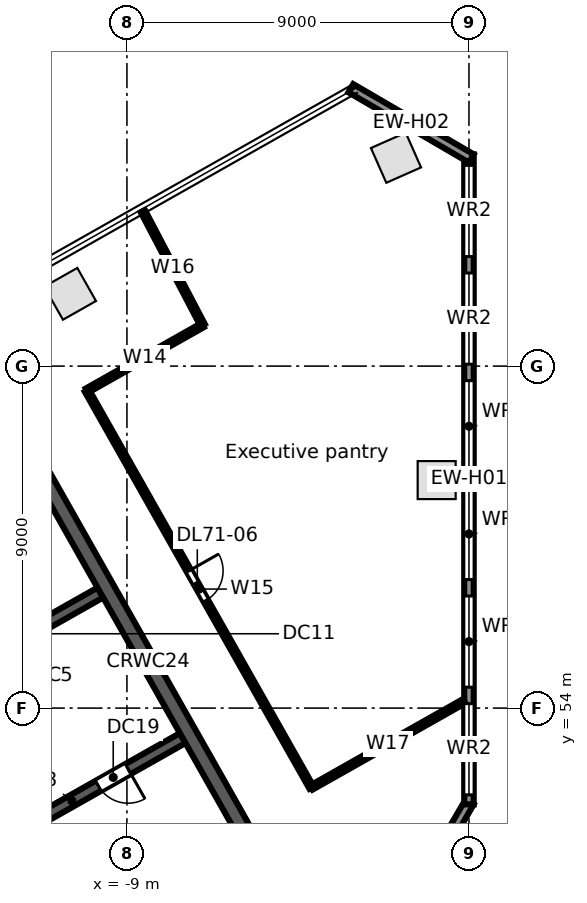
"""IFC4 building model, lengths in metres.
Left out: names, types, materials, properties, quantities, classifications, styles, units other than length and angle.
Written with IfcOpenShell. Run it as: python <this file> out.ifc"""

import sys

from ifc_helpers import new_model, si_unit, direction, frame, frame_2d, origin, origin_2d, place, context, subcontext, project, spatial, rectangle, extrude, element, fill, save


model = new_model("IFC4")
c1 = context("Model", 3, precision=1e-05, world=origin(), true_north=direction((0.0, 1.0)))
c2 = subcontext(c1, "Body", "Model", "MODEL_VIEW")
j1 = project(units=[si_unit("LENGTHUNIT", "METRE"), si_unit("PLANEANGLEUNIT", "RADIAN")], contexts=[c1])
p1 = place(None, origin())
s1 = spatial("IfcSite", under=j1, at=p1, CompositionType="ELEMENT")
p2 = place(p1, origin())
s2 = spatial("IfcBuilding", under=s1, at=p2, CompositionType="ELEMENT")
p3 = place(p2, frame((0.0, 0.0, 316.5)))
s3 = spatial("IfcBuildingStorey", under=s2, at=p3, CompositionType="ELEMENT", Elevation=316.5)
for number, where, z_axis, x_axis in (
    (1, (-10.495, 64.902, 0.0), (0.0, 0.0, 1.0), (-0.87, -0.492, 0.0)),
    (2, (-0.85, 60.0, 0.0), (0.0, 0.0, 1.0), (0.0, 1.0, 0.0)),
    (3, (-1.92, 68.483, 0.0), (0.0, 0.0, 1.0), (-0.915, -0.404, 0.0)),
):
    element("IfcColumn", number, at=place(p3, frame(where, z_axis=z_axis, x_axis=x_axis)), inside=s3, PredefinedType="COLUMN", context=c2, shape_type="SweptSolid", body=[
        extrude(rectangle(XDim=1.0, YDim=1.0, at=origin_2d()), origin(), (0.0, 0.0, 1.0), 3.8),
    ])
p4 = place(p3, frame((0.017, 51.529, 0.0), z_axis=(0.0, 0.0, 1.0), x_axis=(-0.503769237131, -0.863838269424, 0.0)))
e4 = element("IfcWall", 4, at=p4, inside=s3, PredefinedType="STANDARD", context=c2, shape_type="SweptSolid", body=[
    extrude(rectangle(XDim=6.115, YDim=0.25, at=frame_2d((3.057, 0.0))), origin(), (0.0, 0.0, 1.0), 3.52),
])
p5 = place(p3, frame((0.0, 68.572, 0.0), z_axis=(0.0, 0.0, 1.0), x_axis=(0.0, -1.0, 0.0)))
e5 = element("IfcWall", 5, at=p5, inside=s3, PredefinedType="STANDARD", context=c2, shape_type="SweptSolid", body=[
    extrude(rectangle(XDim=17.105, YDim=0.25, at=frame_2d((8.553, 0.0))), origin(), (0.0, 0.0, 1.0), 3.52),
])
p6 = place(p5, frame((14.455, 0.0, 0.8)))
e6 = element("IfcOpeningElement", 6, at=p6, cuts=e5, PredefinedType="OPENING", context=c2, shape_type="SweptSolid", body=[
    extrude(rectangle(XDim=2.4, YDim=2.2, at=frame_2d((1.2, 1.1))), frame((0.0, 0.135, 0.0), z_axis=(0.0, -1.0, 0.0), x_axis=(1.0, 0.0, 0.0)), (0.0, 0.0, 1.0), 0.27),
])
p7 = place(p5, frame((11.622, 0.0, 0.8)))
e7 = element("IfcOpeningElement", 7, at=p7, cuts=e5, PredefinedType="OPENING", context=c2, shape_type="SweptSolid", body=[
    extrude(rectangle(XDim=2.4, YDim=2.2, at=frame_2d((1.2, 1.1))), frame((0.0, 0.135, 0.0), z_axis=(0.0, -1.0, 0.0), x_axis=(1.0, 0.0, 0.0)), (0.0, 0.0, 1.0), 0.27),
])
p8 = place(p5, frame((8.789, 0.0, 0.8)))
e8 = element("IfcOpeningElement", 8, at=p8, cuts=e5, PredefinedType="OPENING", context=c2, shape_type="SweptSolid", body=[
    extrude(rectangle(XDim=2.4, YDim=2.2, at=frame_2d((1.2, 1.1))), frame((0.0, 0.135, 0.0), z_axis=(0.0, -1.0, 0.0), x_axis=(1.0, 0.0, 0.0)), (0.0, 0.0, 1.0), 0.27),
])
p9 = place(p5, frame((5.955, 0.0, 0.8)))
e9 = element("IfcOpeningElement", 9, at=p9, cuts=e5, PredefinedType="OPENING", context=c2, shape_type="SweptSolid", body=[
    extrude(rectangle(XDim=2.4, YDim=2.2, at=frame_2d((1.2, 1.1))), frame((0.0, 0.135, 0.0), z_axis=(0.0, -1.0, 0.0), x_axis=(1.0, 0.0, 0.0)), (0.0, 0.0, 1.0), 0.27),
])
p10 = place(p5, frame((3.122, 0.0, 0.8)))
e10 = element("IfcOpeningElement", 10, at=p10, cuts=e5, PredefinedType="OPENING", context=c2, shape_type="SweptSolid", body=[
    extrude(rectangle(XDim=2.4, YDim=2.2, at=frame_2d((1.2, 1.1))), frame((0.0, 0.135, 0.0), z_axis=(0.0, -1.0, 0.0), x_axis=(1.0, 0.0, 0.0)), (0.0, 0.0, 1.0), 0.27),
])
p11 = place(p5, frame((0.289, 0.0, 0.8)))
e11 = element("IfcOpeningElement", 11, at=p11, cuts=e5, PredefinedType="OPENING", context=c2, shape_type="SweptSolid", body=[
    extrude(rectangle(XDim=2.4, YDim=2.2, at=frame_2d((1.2, 1.1))), frame((0.0, 0.135, 0.0), z_axis=(0.0, -1.0, 0.0), x_axis=(1.0, 0.0, 0.0)), (0.0, 0.0, 1.0), 0.27),
])
p12 = place(p3, frame((-3.108, 70.313, 0.0), z_axis=(0.0, 0.0, 1.0), x_axis=(0.86382474085, -0.503792434536, 0.0)))
e12 = element("IfcWall", 12, at=p12, inside=s3, PredefinedType="STANDARD", context=c2, shape_type="SweptSolid", body=[
    extrude(rectangle(XDim=3.67, YDim=0.25, at=frame_2d((1.835, 0.0))), origin(), (0.0, 0.0, 1.0), 3.52),
])
p13 = place(p3, frame((-13.365, 49.911, 0.0), z_axis=(0.0, 0.0, 1.0), x_axis=(0.870347618718, 0.492437836272, 0.0)))
e13 = element("IfcWall", 13, at=p13, inside=s3, PredefinedType="SOLIDWALL", context=c2, shape_type="SweptSolid", body=[
    extrude(rectangle(XDim=6.7, YDim=0.3, at=frame_2d((3.35, 0.0))), origin(), (0.0, 0.0, 1.0), 3.52),
])
p14 = place(p13, frame((0.75, 0.0, 0.0)))
e14 = element("IfcOpeningElement", 14, at=p14, cuts=e13, PredefinedType="OPENING", context=c2, shape_type="SweptSolid", body=[
    extrude(rectangle(XDim=0.9, YDim=2.1, at=frame_2d((0.45, 1.05))), frame((0.0, 0.16, 0.0), z_axis=(0.0, -1.0, 0.0), x_axis=(1.0, 0.0, 0.0)), (0.0, 0.0, 1.0), 0.32),
])
p15 = place(p13, frame((4.15, 0.0, 0.0)))
e15 = element("IfcOpeningElement", 15, at=p15, cuts=e13, PredefinedType="OPENING", context=c2, shape_type="SweptSolid", body=[
    extrude(rectangle(XDim=0.9, YDim=2.1, at=frame_2d((0.45, 1.05))), frame((0.0, 0.16, 0.0), z_axis=(0.0, -1.0, 0.0), x_axis=(1.0, 0.0, 0.0)), (0.0, 0.0, 1.0), 0.32),
])
p16 = place(p3, frame((-15.618, 53.691, 0.0), z_axis=(0.0, 0.0, 1.0), x_axis=(0.870362830851, 0.492410948978, 0.0)))
e16 = element("IfcWall", 16, at=p16, inside=s3, PredefinedType="SOLIDWALL", context=c2, shape_type="SweptSolid", body=[
    extrude(rectangle(XDim=6.8, YDim=0.3, at=frame_2d((3.4, 0.0))), origin(), (0.0, 0.0, 1.0), 3.52),
])
p17 = place(p16, frame((0.7, 0.0, 0.0)))
e17 = element("IfcOpeningElement", 17, at=p17, cuts=e16, PredefinedType="OPENING", context=c2, shape_type="SweptSolid", body=[
    extrude(rectangle(XDim=0.9, YDim=2.1, at=frame_2d((0.45, 1.05))), frame((0.0, 0.16, 0.0), z_axis=(0.0, -1.0, 0.0), x_axis=(1.0, 0.0, 0.0)), (0.0, 0.0, 1.0), 0.32),
])
p18 = place(p16, frame((4.15, 0.0, 0.0)))
e18 = element("IfcOpeningElement", 18, at=p18, cuts=e16, PredefinedType="OPENING", context=c2, shape_type="SweptSolid", body=[
    extrude(rectangle(XDim=0.9, YDim=2.1, at=frame_2d((0.45, 1.05))), frame((0.0, 0.16, 0.0), z_axis=(0.0, -1.0, 0.0), x_axis=(1.0, 0.0, 0.0)), (0.0, 0.0, 1.0), 0.32),
])
p19 = place(p3, frame((-11.202, 50.962, 0.0), z_axis=(0.0, 0.0, 1.0), x_axis=(0.492441437811, -0.870345580977, 0.0)))
e19 = element("IfcWall", 19, at=p19, inside=s3, PredefinedType="PARTITIONING", context=c2, shape_type="SweptSolid", body=[
    extrude(rectangle(XDim=4.25, YDim=0.2, at=frame_2d((2.125, 0.0))), origin(), (0.0, 0.0, 1.0), 3.52),
])
p20 = place(p3, frame((-11.692, 60.968, 0.0), z_axis=(0.0, 0.0, 1.0), x_axis=(0.492421663121, -0.870356769198, 0.0)))
e20 = element("IfcWall", 20, at=p20, inside=s3, PredefinedType="SOLIDWALL", context=c2, shape_type="SweptSolid", body=[
    extrude(rectangle(XDim=13.2, YDim=0.4, at=frame_2d((6.6, 0.0))), origin(), (0.0, 0.0, 1.0), 3.52),
])
p21 = place(p3, frame((-10.054, 62.355, 0.0), z_axis=(0.0, 0.0, 1.0), x_axis=(0.870470590541, 0.492220429283, 0.0)))
e21 = element("IfcWall", 21, at=p21, inside=s3, PredefinedType="PARTITIONING", context=c2, shape_type="SweptSolid", body=[
    extrude(rectangle(XDim=3.5, YDim=0.125, at=frame_2d((1.75, 0.0))), origin(), (0.0, 0.0, 1.0), 3.52),
])
p22 = place(p3, frame((-10.054, 62.355, 0.0), z_axis=(0.0, 0.0, 1.0), x_axis=(0.49244734164, -0.870342240565, 0.0)))
e22 = element("IfcWall", 22, at=p22, inside=s3, PredefinedType="PARTITIONING", context=c2, shape_type="SweptSolid", body=[
    extrude(rectangle(XDim=12.001, YDim=0.125, at=frame_2d((6.0, 0.0))), origin(), (0.0, 0.0, 1.0), 2.7),
])
p23 = place(p22, frame((5.45, 0.0, 0.0)))
e23 = element("IfcOpeningElement", 23, at=p23, cuts=e22, PredefinedType="OPENING", context=c2, shape_type="SweptSolid", body=[
    extrude(rectangle(XDim=0.9, YDim=2.1, at=frame_2d((0.45, 1.05))), frame((0.0, 0.073, 0.0), z_axis=(0.0, -1.0, 0.0), x_axis=(1.0, 0.0, 0.0)), (0.0, 0.0, 1.0), 0.145),
])
p24 = place(p3, frame((-8.581, 67.076, 0.0), z_axis=(0.0, 0.0, 1.0), x_axis=(0.46483389899, -0.885397902838, 0.0)))
e24 = element("IfcWall", 24, at=p24, inside=s3, PredefinedType="PARTITIONING", context=c2, shape_type="SweptSolid", body=[
    extrude(rectangle(XDim=3.386, YDim=0.125, at=frame_2d((1.693, 0.0))), origin(), (0.0, 0.0, 1.0), 2.888),
])
p25 = place(p3, frame((-4.144, 51.91, 0.0), z_axis=(0.0, 0.0, 1.0), x_axis=(0.870327404496, 0.49247356171, 0.0)))
e25 = element("IfcWall", 25, at=p25, inside=s3, PredefinedType="PARTITIONING", context=c2, shape_type="SweptSolid", body=[
    extrude(rectangle(XDim=4.618, YDim=0.125, at=frame_2d((2.309, 0.0))), origin(), (0.0, 0.0, 1.0), 2.8),
])
p26 = place(p6, origin())
e26 = element("IfcWindow", 26, at=p26, inside=s3, PartitioningType="SINGLE_PANEL", PredefinedType="WINDOW", context=c2, shape_type="SweptSolid", body=[
    extrude(rectangle(XDim=2.4, YDim=2.2, at=frame_2d((1.2, 1.1))), frame((0.0, 0.03, 0.0), z_axis=(0.0, -1.0, 0.0), x_axis=(1.0, 0.0, 0.0)), (0.0, 0.0, 1.0), 0.06),
])
fill(e6, e26)
p27 = place(p7, origin())
e27 = element("IfcWindow", 27, at=p27, inside=s3, PartitioningType="SINGLE_PANEL", PredefinedType="WINDOW", context=c2, shape_type="SweptSolid", body=[
    extrude(rectangle(XDim=2.4, YDim=2.2, at=frame_2d((1.2, 1.1))), frame((0.0, 0.03, 0.0), z_axis=(0.0, -1.0, 0.0), x_axis=(1.0, 0.0, 0.0)), (0.0, 0.0, 1.0), 0.06),
])
fill(e7, e27)
p28 = place(p8, origin())
e28 = element("IfcWindow", 28, at=p28, inside=s3, PartitioningType="SINGLE_PANEL", PredefinedType="WINDOW", context=c2, shape_type="SweptSolid", body=[
    extrude(rectangle(XDim=2.4, YDim=2.2, at=frame_2d((1.2, 1.1))), frame((0.0, 0.03, 0.0), z_axis=(0.0, -1.0, 0.0), x_axis=(1.0, 0.0, 0.0)), (0.0, 0.0, 1.0), 0.06),
])
fill(e8, e28)
p29 = place(p9, origin())
e29 = element("IfcWindow", 29, at=p29, inside=s3, PartitioningType="SINGLE_PANEL", PredefinedType="WINDOW", context=c2, shape_type="SweptSolid", body=[
    extrude(rectangle(XDim=2.4, YDim=2.2, at=frame_2d((1.2, 1.1))), frame((0.0, 0.03, 0.0), z_axis=(0.0, -1.0, 0.0), x_axis=(1.0, 0.0, 0.0)), (0.0, 0.0, 1.0), 0.06),
])
fill(e9, e29)
p30 = place(p10, origin())
e30 = element("IfcWindow", 30, at=p30, inside=s3, PartitioningType="SINGLE_PANEL", PredefinedType="WINDOW", context=c2, shape_type="SweptSolid", body=[
    extrude(rectangle(XDim=2.4, YDim=2.2, at=frame_2d((1.2, 1.1))), frame((0.0, 0.03, 0.0), z_axis=(0.0, -1.0, 0.0), x_axis=(1.0, 0.0, 0.0)), (0.0, 0.0, 1.0), 0.06),
])
fill(e10, e30)
p31 = place(p11, origin())
e31 = element("IfcWindow", 31, at=p31, inside=s3, PartitioningType="SINGLE_PANEL", PredefinedType="WINDOW", context=c2, shape_type="SweptSolid", body=[
    extrude(rectangle(XDim=2.4, YDim=2.2, at=frame_2d((1.2, 1.1))), frame((0.0, 0.03, 0.0), z_axis=(0.0, -1.0, 0.0), x_axis=(1.0, 0.0, 0.0)), (0.0, 0.0, 1.0), 0.06),
])
fill(e11, e31)
p32 = place(p15, frame((0.9, 0.0, 0.0), z_axis=(0.0, 0.0, 1.0), x_axis=(-1.0, 0.0, 0.0)))
e32 = element("IfcDoor", 32, at=p32, inside=s3, OperationType="SINGLE_SWING_LEFT", PredefinedType="DOOR", context=c2, shape_type="SweptSolid", body=[
    extrude(rectangle(XDim=0.9, YDim=2.1, at=frame_2d((0.45, 1.05))), frame((0.0, 0.025, 0.0), z_axis=(0.0, -1.0, 0.0), x_axis=(1.0, 0.0, 0.0)), (0.0, 0.0, 1.0), 0.05),
])
fill(e15, e32)
p33 = place(p23, origin())
e33 = element("IfcDoor", 33, at=p33, inside=s3, OperationType="SINGLE_SWING_LEFT", PredefinedType="DOOR", context=c2, shape_type="SweptSolid", body=[
    extrude(rectangle(XDim=0.9, YDim=2.1, at=frame_2d((0.45, 1.05))), frame((0.0, 0.025, 0.0), z_axis=(0.0, -1.0, 0.0), x_axis=(1.0, 0.0, 0.0)), (0.0, 0.0, 1.0), 0.05),
])
fill(e23, e33)
save(model, sys.argv[1])
